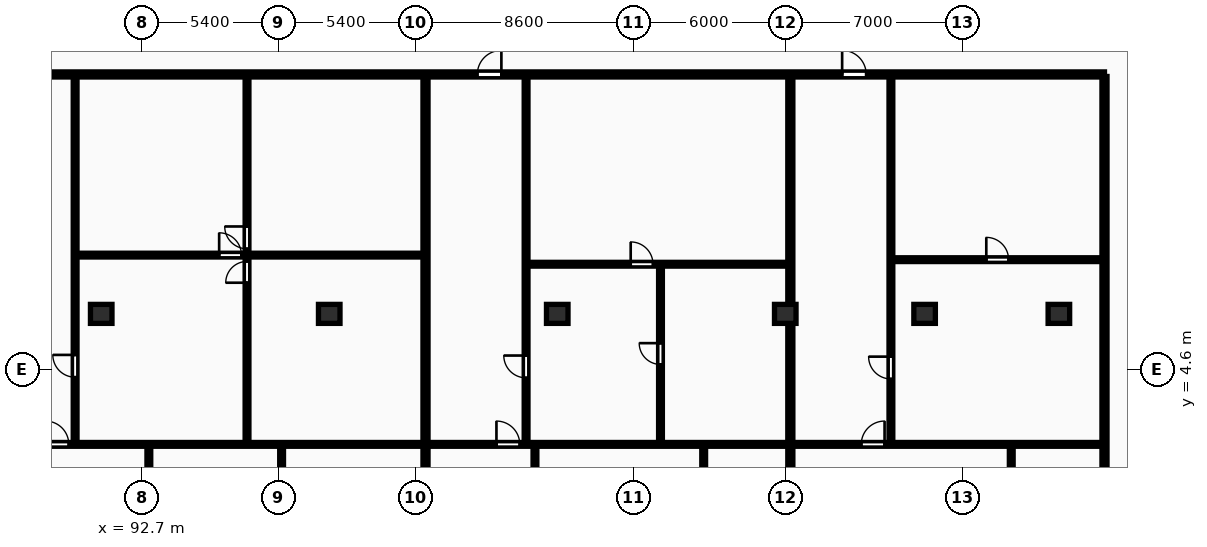
"""IFC4 building model, lengths in metres.
Left out: names, types, materials, properties, quantities, classifications, styles, units other than length and angle.
Written with IfcOpenShell. Run it as: python <this file> out.ifc"""

import sys

from ifc_helpers import new_model, si_unit, direction, frame, frame_2d, origin, origin_2d, place, context, subcontext, project, spatial, rectangle, extrude, element, fill, save


model = new_model("IFC4")
c1 = context("Model", 3, precision=1e-05, world=origin(), true_north=direction((0.0, 1.0)))
c2 = subcontext(c1, "Body", "Model", "MODEL_VIEW")
j1 = project(units=[si_unit("LENGTHUNIT", "METRE"), si_unit("PLANEANGLEUNIT", "RADIAN")], contexts=[c1])
p1 = place(None, origin())
s1 = spatial("IfcSite", under=j1, at=p1, CompositionType="ELEMENT")
p2 = place(p1, origin())
s2 = spatial("IfcBuilding", under=s1, at=p2, CompositionType="ELEMENT")
p3 = place(p2, frame((0.0, 0.0, 87.3)))
s3 = spatial("IfcBuildingStorey", under=s2, at=p3, CompositionType="ELEMENT", Elevation=87.3)
for number, where, z_axis, x_axis in (
    (1, (91.1, 6.8, 0.0), (0.0, 0.0, 1.0), (1.0, 0.0, 0.0)),
    (2, (100.1, 6.8, 0.0), (0.0, 0.0, 1.0), (1.0, 0.0, 0.0)),
    (3, (109.1, 6.8, 0.0), (0.0, 0.0, 1.0), (1.0, 0.0, 0.0)),
    (4, (118.1, 6.8, 0.0), (0.0, 0.0, 1.0), (1.0, 0.0, 0.0)),
    (5, (123.6, 6.8, 0.0), (0.0, 0.0, 1.0), (1.0, 0.0, 0.0)),
    (6, (128.9, 6.8, 0.0), (0.0, 0.0, 1.0), (1.0, 0.0, 0.0)),
):
    element("IfcColumn", number, at=place(p3, frame(where, z_axis=z_axis, x_axis=x_axis)), inside=s3, PredefinedType="COLUMN", context=c2, shape_type="SweptSolid", body=[
        extrude(rectangle(XDim=0.85, YDim=0.75, at=origin_2d()), origin(), (0.0, 0.0, 1.0), 3.25),
    ])
for number, where, z_axis, x_axis in (
    (7, (130.7, -8.7, 0.0), (0.0, 0.0, 1.0), (0.0, 1.0, 0.0)),
    (8, (103.9, -8.7, 0.0), (0.0, 0.0, 1.0), (0.0, 1.0, 0.0)),
):
    element("IfcWall", number, at=place(p3, frame(where, z_axis=z_axis, x_axis=x_axis)), inside=s3, PredefinedType="PARTITIONING", context=c2, shape_type="SweptSolid", body=[
        extrude(rectangle(XDim=24.87, YDim=0.2, at=frame_2d((12.435, 0.0))), origin(), (0.0, 0.0, 1.0), 2.97),
    ])
p4 = place(p3, frame((96.855, 1.69, 0.0), z_axis=(0.0, 0.0, 1.0), x_axis=(0.0, 1.0, 0.0)))
e9 = element("IfcWall", 9, at=p4, inside=s3, PredefinedType="PARTITIONING", context=c2, shape_type="SweptSolid", body=[
    extrude(rectangle(XDim=14.5, YDim=0.15, at=frame_2d((7.25, 0.0))), origin(), (0.0, 0.0, 1.0), 2.97),
])
p5 = place(p4, frame((6.34, 0.0, 0.0)))
e10 = element("IfcOpeningElement", 10, at=p5, cuts=e9, PredefinedType="OPENING", context=c2, shape_type="SweptSolid", body=[
    extrude(rectangle(XDim=0.84, YDim=2.04, at=frame_2d((0.42, 1.02))), frame((0.0, 0.085, 0.0), z_axis=(0.0, -1.0, 0.0), x_axis=(1.0, 0.0, 0.0)), (0.0, 0.0, 1.0), 0.17),
])
p6 = place(p4, frame((7.68, 0.0, 0.0)))
e11 = element("IfcOpeningElement", 11, at=p6, cuts=e9, PredefinedType="OPENING", context=c2, shape_type="SweptSolid", body=[
    extrude(rectangle(XDim=0.88, YDim=2.06, at=frame_2d((0.44, 1.03))), frame((0.0, 0.085, 0.0), z_axis=(0.0, -1.0, 0.0), x_axis=(1.0, 0.0, 0.0)), (0.0, 0.0, 1.0), 0.17),
])
p7 = place(p3, frame((90.13, 9.12, 0.0), z_axis=(0.0, 0.0, 1.0), x_axis=(1.0, 0.0, 0.0)))
e12 = element("IfcWall", 12, at=p7, inside=s3, PredefinedType="PARTITIONING", context=c2, shape_type="SweptSolid", body=[
    extrude(rectangle(XDim=13.69, YDim=0.15, at=frame_2d((6.845, 0.0))), origin(), (0.0, 0.0, 1.0), 2.97),
])
p8 = place(p7, frame((5.625, 0.0, 0.0)))
e13 = element("IfcOpeningElement", 13, at=p8, cuts=e12, PredefinedType="OPENING", context=c2, shape_type="SweptSolid", body=[
    extrude(rectangle(XDim=0.88, YDim=2.06, at=frame_2d((0.44, 1.03))), frame((0.0, 0.085, 0.0), z_axis=(0.0, -1.0, 0.0), x_axis=(1.0, 0.0, 0.0)), (0.0, 0.0, 1.0), 0.17),
])
p9 = place(p3, frame((90.07, 1.69, 0.0), z_axis=(0.0, 0.0, 1.0), x_axis=(0.0, 1.0, 0.0)))
e14 = element("IfcWall", 14, at=p9, inside=s3, PredefinedType="PARTITIONING", context=c2, shape_type="SweptSolid", body=[
    extrude(rectangle(XDim=14.5, YDim=0.15, at=frame_2d((7.25, 0.0))), origin(), (0.0, 0.0, 1.0), 2.97),
])
p10 = place(p9, frame((2.611, 0.0, 0.0)))
e15 = element("IfcOpeningElement", 15, at=p10, cuts=e14, PredefinedType="OPENING", context=c2, shape_type="SweptSolid", body=[
    extrude(rectangle(XDim=0.88, YDim=2.06, at=frame_2d((0.44, 1.03))), frame((0.0, 0.085, 0.0), z_axis=(0.0, -1.0, 0.0), x_axis=(1.0, 0.0, 0.0)), (0.0, 0.0, 1.0), 0.17),
])
p11 = place(p3, frame((92.98, -8.7, 0.0), z_axis=(0.0, 0.0, 1.0), x_axis=(0.0, 1.0, 0.0)))
e16 = element("IfcWall", 16, at=p11, inside=s3, PredefinedType="PARTITIONING", context=c2, shape_type="SweptSolid", body=[
    extrude(rectangle(XDim=10.31, YDim=0.15, at=frame_2d((5.155, 0.0))), origin(), (0.0, 0.0, 1.0), 2.97),
])
p12 = place(p11, frame((6.116, 0.0, 0.0)))
e17 = element("IfcOpeningElement", 17, at=p12, cuts=e16, PredefinedType="OPENING", context=c2, shape_type="SweptSolid", body=[
    extrude(rectangle(XDim=0.92, YDim=2.08, at=frame_2d((0.46, 1.04))), frame((0.0, 0.085, 0.0), z_axis=(0.0, -1.0, 0.0), x_axis=(1.0, 0.0, 0.0)), (0.0, 0.0, 1.0), 0.17),
])
p13 = place(p3, frame((98.22, -0.86, 0.0), z_axis=(0.0, 0.0, 1.0), x_axis=(0.0, 1.0, 0.0)))
e18 = element("IfcWall", 18, at=p13, inside=s3, PredefinedType="PARTITIONING", context=c2, shape_type="SweptSolid", body=[
    extrude(rectangle(XDim=2.47, YDim=0.15, at=frame_2d((1.235, 0.0))), origin(), (0.0, 0.0, 1.0), 2.97),
])
p14 = place(p3, frame((86.18, 1.65, 0.0), z_axis=(0.0, 0.0, 1.0), x_axis=(1.0, 0.0, 0.0)))
e19 = element("IfcWall", 19, at=p14, inside=s3, PredefinedType="PARTITIONING", context=c2, shape_type="SweptSolid", body=[
    extrude(rectangle(XDim=17.64, YDim=0.15, at=frame_2d((8.82, 0.0))), origin(), (0.0, 0.0, 1.0), 2.97),
])
p15 = place(p14, frame((2.72, 0.0, 0.0)))
e20 = element("IfcOpeningElement", 20, at=p15, cuts=e19, PredefinedType="OPENING", context=c2, shape_type="SweptSolid", body=[
    extrude(rectangle(XDim=0.92, YDim=2.08, at=frame_2d((0.46, 1.04))), frame((0.0, 0.085, 0.0), z_axis=(0.0, -1.0, 0.0), x_axis=(1.0, 0.0, 0.0)), (0.0, 0.0, 1.0), 0.17),
])
p16 = place(p3, frame((118.3, -8.7, 0.0), z_axis=(0.0, 0.0, 1.0), x_axis=(0.0, 1.0, 0.0)))
e21 = element("IfcWall", 21, at=p16, inside=s3, PredefinedType="PARTITIONING", context=c2, shape_type="SweptSolid", body=[
    extrude(rectangle(XDim=24.87, YDim=0.2, at=frame_2d((12.435, 0.0))), origin(), (0.0, 0.0, 1.0), 2.2),
])
p17 = place(p3, frame((113.175, 1.69, 0.0), z_axis=(0.0, 0.0, 1.0), x_axis=(0.0, 1.0, 0.0)))
e22 = element("IfcWall", 22, at=p17, inside=s3, PredefinedType="PARTITIONING", context=c2, shape_type="SweptSolid", body=[
    extrude(rectangle(XDim=7.07, YDim=0.15, at=frame_2d((3.535, 0.0))), origin(), (0.0, 0.0, 1.0), 2.97),
])
p18 = place(p17, frame((3.115, 0.0, 0.0)))
e23 = element("IfcOpeningElement", 23, at=p18, cuts=e22, PredefinedType="OPENING", context=c2, shape_type="SweptSolid", body=[
    extrude(rectangle(XDim=0.84, YDim=2.04, at=frame_2d((0.42, 1.02))), frame((0.0, 0.085, 0.0), z_axis=(0.0, -1.0, 0.0), x_axis=(1.0, 0.0, 0.0)), (0.0, 0.0, 1.0), 0.17),
])
p19 = place(p3, frame((107.93, 8.76, 0.0), z_axis=(0.0, 0.0, 1.0), x_axis=(1.0, 0.0, 0.0)))
e24 = element("IfcWall", 24, at=p19, inside=s3, PredefinedType="PARTITIONING", context=c2, shape_type="SweptSolid", body=[
    extrude(rectangle(XDim=10.29, YDim=0.15, at=frame_2d((5.145, 0.0))), origin(), (0.0, 0.0, 1.0), 2.97),
])
p20 = place(p19, frame((4.069, 0.0, 0.0)))
e25 = element("IfcOpeningElement", 25, at=p20, cuts=e24, PredefinedType="OPENING", context=c2, shape_type="SweptSolid", body=[
    extrude(rectangle(XDim=0.88, YDim=2.06, at=frame_2d((0.44, 1.03))), frame((0.0, 0.085, 0.0), z_axis=(0.0, -1.0, 0.0), x_axis=(1.0, 0.0, 0.0)), (0.0, 0.0, 1.0), 0.17),
])
p21 = place(p3, frame((107.87, 1.69, 0.0), z_axis=(0.0, 0.0, 1.0), x_axis=(0.0, 1.0, 0.0)))
e26 = element("IfcWall", 26, at=p21, inside=s3, PredefinedType="PARTITIONING", context=c2, shape_type="SweptSolid", body=[
    extrude(rectangle(XDim=14.5, YDim=0.15, at=frame_2d((7.25, 0.0))), origin(), (0.0, 0.0, 1.0), 2.97),
])
p22 = place(p21, frame((2.586, 0.0, 0.0)))
e27 = element("IfcOpeningElement", 27, at=p22, cuts=e26, PredefinedType="OPENING", context=c2, shape_type="SweptSolid", body=[
    extrude(rectangle(XDim=0.88, YDim=2.06, at=frame_2d((0.44, 1.03))), frame((0.0, 0.085, 0.0), z_axis=(0.0, -1.0, 0.0), x_axis=(1.0, 0.0, 0.0)), (0.0, 0.0, 1.0), 0.17),
])
p23 = place(p3, frame((108.22, -3.39, 0.0), z_axis=(0.0, 0.0, 1.0), x_axis=(0.0, 1.0, 0.0)))
e28 = element("IfcWall", 28, at=p23, inside=s3, PredefinedType="PARTITIONING", context=c2, shape_type="SweptSolid", body=[
    extrude(rectangle(XDim=5.0, YDim=0.15, at=frame_2d((2.5, 0.0))), origin(), (0.0, 0.0, 1.0), 2.97),
])
p24 = place(p23, frame((2.06, 0.0, 0.0)))
e29 = element("IfcOpeningElement", 29, at=p24, cuts=e28, PredefinedType="OPENING", context=c2, shape_type="SweptSolid", body=[
    extrude(rectangle(XDim=0.88, YDim=2.06, at=frame_2d((0.44, 1.03))), frame((0.0, 0.085, 0.0), z_axis=(0.0, -1.0, 0.0), x_axis=(1.0, 0.0, 0.0)), (0.0, 0.0, 1.0), 0.17),
])
p25 = place(p3, frame((114.88, -8.7, 0.0), z_axis=(0.0, 0.0, 1.0), x_axis=(0.0, 1.0, 0.0)))
e30 = element("IfcWall", 30, at=p25, inside=s3, PredefinedType="PARTITIONING", context=c2, shape_type="SweptSolid", body=[
    extrude(rectangle(XDim=10.31, YDim=0.15, at=frame_2d((5.155, 0.0))), origin(), (0.0, 0.0, 1.0), 2.97),
])
p26 = place(p25, frame((5.55, 0.0, 0.0)))
e31 = element("IfcOpeningElement", 31, at=p26, cuts=e30, PredefinedType="OPENING", context=c2, shape_type="SweptSolid", body=[
    extrude(rectangle(XDim=0.84, YDim=2.04, at=frame_2d((0.42, 1.02))), frame((0.0, 0.085, 0.0), z_axis=(0.0, -1.0, 0.0), x_axis=(1.0, 0.0, 0.0)), (0.0, 0.0, 1.0), 0.17),
])
p27 = place(p25, frame((8.04, 0.0, 0.0)))
e32 = element("IfcOpeningElement", 32, at=p27, cuts=e30, PredefinedType="OPENING", context=c2, shape_type="SweptSolid", body=[
    extrude(rectangle(XDim=0.84, YDim=2.04, at=frame_2d((0.42, 1.02))), frame((0.0, 0.085, 0.0), z_axis=(0.0, -1.0, 0.0), x_axis=(1.0, 0.0, 0.0)), (0.0, 0.0, 1.0), 0.17),
])
p28 = place(p25, frame((3.95, 0.0, 0.0)))
e33 = element("IfcOpeningElement", 33, at=p28, cuts=e30, PredefinedType="OPENING", context=c2, shape_type="SweptSolid", body=[
    extrude(rectangle(XDim=0.88, YDim=2.06, at=frame_2d((0.44, 1.03))), frame((0.0, 0.085, 0.0), z_axis=(0.0, -1.0, 0.0), x_axis=(1.0, 0.0, 0.0)), (0.0, 0.0, 1.0), 0.17),
])
p29 = place(p3, frame((103.98, 1.65, 0.0), z_axis=(0.0, 0.0, 1.0), x_axis=(1.0, 0.0, 0.0)))
e34 = element("IfcWall", 34, at=p29, inside=s3, PredefinedType="PARTITIONING", context=c2, shape_type="SweptSolid", body=[
    extrude(rectangle(XDim=14.24, YDim=0.15, at=frame_2d((7.12, 0.0))), origin(), (0.0, 0.0, 1.0), 2.97),
])
p30 = place(p29, frame((2.72, 0.0, 0.0)))
e35 = element("IfcOpeningElement", 35, at=p30, cuts=e34, PredefinedType="OPENING", context=c2, shape_type="SweptSolid", body=[
    extrude(rectangle(XDim=0.92, YDim=2.08, at=frame_2d((0.46, 1.04))), frame((0.0, 0.085, 0.0), z_axis=(0.0, -1.0, 0.0), x_axis=(1.0, 0.0, 0.0)), (0.0, 0.0, 1.0), 0.17),
])
p31 = place(p3, frame((122.33, 8.94, 0.0), z_axis=(0.0, 0.0, 1.0), x_axis=(1.0, 0.0, 0.0)))
e36 = element("IfcWall", 36, at=p31, inside=s3, PredefinedType="PARTITIONING", context=c2, shape_type="SweptSolid", body=[
    extrude(rectangle(XDim=8.29, YDim=0.15, at=frame_2d((4.145, 0.0))), origin(), (0.0, 0.0, 1.0), 2.97),
])
p32 = place(p31, frame((3.705, 0.0, 0.0)))
e37 = element("IfcOpeningElement", 37, at=p32, cuts=e36, PredefinedType="OPENING", context=c2, shape_type="SweptSolid", body=[
    extrude(rectangle(XDim=0.88, YDim=2.06, at=frame_2d((0.44, 1.03))), frame((0.0, 0.085, 0.0), z_axis=(0.0, -1.0, 0.0), x_axis=(1.0, 0.0, 0.0)), (0.0, 0.0, 1.0), 0.17),
])
p33 = place(p3, frame((122.27, 1.69, 0.0), z_axis=(0.0, 0.0, 1.0), x_axis=(0.0, 1.0, 0.0)))
e38 = element("IfcWall", 38, at=p33, inside=s3, PredefinedType="PARTITIONING", context=c2, shape_type="SweptSolid", body=[
    extrude(rectangle(XDim=14.5, YDim=0.15, at=frame_2d((7.25, 0.0))), origin(), (0.0, 0.0, 1.0), 2.97),
])
p34 = place(p33, frame((2.542, 0.0, 0.0)))
e39 = element("IfcOpeningElement", 39, at=p34, cuts=e38, PredefinedType="OPENING", context=c2, shape_type="SweptSolid", body=[
    extrude(rectangle(XDim=0.88, YDim=2.06, at=frame_2d((0.44, 1.03))), frame((0.0, 0.085, 0.0), z_axis=(0.0, -1.0, 0.0), x_axis=(1.0, 0.0, 0.0)), (0.0, 0.0, 1.0), 0.17),
])
p35 = place(p3, frame((127.02, -8.7, 0.0), z_axis=(0.0, 0.0, 1.0), x_axis=(0.0, 1.0, 0.0)))
e40 = element("IfcWall", 40, at=p35, inside=s3, PredefinedType="PARTITIONING", context=c2, shape_type="SweptSolid", body=[
    extrude(rectangle(XDim=10.31, YDim=0.15, at=frame_2d((5.155, 0.0))), origin(), (0.0, 0.0, 1.0), 2.97),
])
p36 = place(p35, frame((6.12, 0.0, 0.0)))
e41 = element("IfcOpeningElement", 41, at=p36, cuts=e40, PredefinedType="OPENING", context=c2, shape_type="SweptSolid", body=[
    extrude(rectangle(XDim=0.84, YDim=2.04, at=frame_2d((0.42, 1.02))), frame((0.0, 0.085, 0.0), z_axis=(0.0, -1.0, 0.0), x_axis=(1.0, 0.0, 0.0)), (0.0, 0.0, 1.0), 0.17),
])
p37 = place(p35, frame((8.04, 0.0, 0.0)))
e42 = element("IfcOpeningElement", 42, at=p37, cuts=e40, PredefinedType="OPENING", context=c2, shape_type="SweptSolid", body=[
    extrude(rectangle(XDim=0.84, YDim=2.04, at=frame_2d((0.42, 1.02))), frame((0.0, 0.085, 0.0), z_axis=(0.0, -1.0, 0.0), x_axis=(1.0, 0.0, 0.0)), (0.0, 0.0, 1.0), 0.17),
])
p38 = place(p35, frame((2.001, 0.0, 0.0)))
e43 = element("IfcOpeningElement", 43, at=p38, cuts=e40, PredefinedType="OPENING", context=c2, shape_type="SweptSolid", body=[
    extrude(rectangle(XDim=0.88, YDim=2.06, at=frame_2d((0.44, 1.03))), frame((0.0, 0.085, 0.0), z_axis=(0.0, -1.0, 0.0), x_axis=(1.0, 0.0, 0.0)), (0.0, 0.0, 1.0), 0.17),
])
p39 = place(p3, frame((118.38, 1.65, 0.0), z_axis=(0.0, 0.0, 1.0), x_axis=(1.0, 0.0, 0.0)))
e44 = element("IfcWall", 44, at=p39, inside=s3, PredefinedType="PARTITIONING", context=c2, shape_type="SweptSolid", body=[
    extrude(rectangle(XDim=12.24, YDim=0.15, at=frame_2d((6.12, 0.0))), origin(), (0.0, 0.0, 1.0), 2.97),
])
p40 = place(p39, frame((2.72, 0.0, 0.0)))
e45 = element("IfcOpeningElement", 45, at=p40, cuts=e44, PredefinedType="OPENING", context=c2, shape_type="SweptSolid", body=[
    extrude(rectangle(XDim=0.92, YDim=2.08, at=frame_2d((0.46, 1.04))), frame((0.0, 0.085, 0.0), z_axis=(0.0, -1.0, 0.0), x_axis=(1.0, 0.0, 0.0)), (0.0, 0.0, 1.0), 0.17),
])
p41 = place(p3, frame((72.7, 16.25, 0.0), z_axis=(0.0, 0.0, 1.0), x_axis=(1.0, 0.0, 0.0)))
e46 = element("IfcWall", 46, at=p41, inside=s3, PredefinedType="PARTITIONING", context=c2, shape_type="SweptSolid", body=[
    extrude(rectangle(XDim=58.0, YDim=0.2, at=frame_2d((29.0, 0.0))), origin(), (0.0, 0.0, 1.0), 2.97),
])
p42 = place(p41, frame((2.77, 0.0, 0.0)))
e47 = element("IfcOpeningElement", 47, at=p42, cuts=e46, PredefinedType="OPENING", context=c2, shape_type="SweptSolid", body=[
    extrude(rectangle(XDim=0.95, YDim=2.15, at=frame_2d((0.475, 1.075))), frame((0.0, 0.11, 0.0), z_axis=(0.0, -1.0, 0.0), x_axis=(1.0, 0.0, 0.0)), (0.0, 0.0, 1.0), 0.22),
])
p43 = place(p41, frame((15.445, 0.0, 0.0)))
e48 = element("IfcOpeningElement", 48, at=p43, cuts=e46, PredefinedType="OPENING", context=c2, shape_type="SweptSolid", body=[
    extrude(rectangle(XDim=0.95, YDim=2.15, at=frame_2d((0.475, 1.075))), frame((0.0, 0.11, 0.0), z_axis=(0.0, -1.0, 0.0), x_axis=(1.0, 0.0, 0.0)), (0.0, 0.0, 1.0), 0.22),
])
p44 = place(p41, frame((33.245, 0.0, 0.0)))
e49 = element("IfcOpeningElement", 49, at=p44, cuts=e46, PredefinedType="OPENING", context=c2, shape_type="SweptSolid", body=[
    extrude(rectangle(XDim=0.95, YDim=2.15, at=frame_2d((0.475, 1.075))), frame((0.0, 0.11, 0.0), z_axis=(0.0, -1.0, 0.0), x_axis=(1.0, 0.0, 0.0)), (0.0, 0.0, 1.0), 0.22),
])
p45 = place(p41, frame((47.645, 0.0, 0.0)))
e50 = element("IfcOpeningElement", 50, at=p45, cuts=e46, PredefinedType="OPENING", context=c2, shape_type="SweptSolid", body=[
    extrude(rectangle(XDim=0.95, YDim=2.15, at=frame_2d((0.475, 1.075))), frame((0.0, 0.11, 0.0), z_axis=(0.0, -1.0, 0.0), x_axis=(1.0, 0.0, 0.0)), (0.0, 0.0, 1.0), 0.22),
])
p46 = place(p5, origin())
e51 = element("IfcDoor", 51, at=p46, inside=s3, OperationType="SINGLE_SWING_LEFT", PredefinedType="DOOR", context=c2, shape_type="SweptSolid", body=[
    extrude(rectangle(XDim=0.84, YDim=2.04, at=frame_2d((0.42, 1.02))), frame((0.0, 0.025, 0.0), z_axis=(0.0, -1.0, 0.0), x_axis=(1.0, 0.0, 0.0)), (0.0, 0.0, 1.0), 0.05),
])
fill(e10, e51)
p47 = place(p6, origin())
e52 = element("IfcDoor", 52, at=p47, inside=s3, OperationType="SINGLE_SWING_RIGHT", PredefinedType="DOOR", context=c2, shape_type="SweptSolid", body=[
    extrude(rectangle(XDim=0.88, YDim=2.06, at=frame_2d((0.44, 1.03))), frame((0.0, 0.025, 0.0), z_axis=(0.0, -1.0, 0.0), x_axis=(1.0, 0.0, 0.0)), (0.0, 0.0, 1.0), 0.05),
])
fill(e11, e52)
p48 = place(p8, origin())
e53 = element("IfcDoor", 53, at=p48, inside=s3, OperationType="SINGLE_SWING_LEFT", PredefinedType="DOOR", context=c2, shape_type="SweptSolid", body=[
    extrude(rectangle(XDim=0.88, YDim=2.06, at=frame_2d((0.44, 1.03))), frame((0.0, 0.025, 0.0), z_axis=(0.0, -1.0, 0.0), x_axis=(1.0, 0.0, 0.0)), (0.0, 0.0, 1.0), 0.05),
])
fill(e13, e53)
p49 = place(p10, origin())
e54 = element("IfcDoor", 54, at=p49, inside=s3, OperationType="SINGLE_SWING_RIGHT", PredefinedType="DOOR", context=c2, shape_type="SweptSolid", body=[
    extrude(rectangle(XDim=0.88, YDim=2.06, at=frame_2d((0.44, 1.03))), frame((0.0, 0.025, 0.0), z_axis=(0.0, -1.0, 0.0), x_axis=(1.0, 0.0, 0.0)), (0.0, 0.0, 1.0), 0.05),
])
fill(e15, e54)
p50 = place(p15, origin())
e55 = element("IfcDoor", 55, at=p50, inside=s3, OperationType="SINGLE_SWING_LEFT", PredefinedType="DOOR", context=c2, shape_type="SweptSolid", body=[
    extrude(rectangle(XDim=0.92, YDim=2.08, at=frame_2d((0.46, 1.04))), frame((0.0, 0.025, 0.0), z_axis=(0.0, -1.0, 0.0), x_axis=(1.0, 0.0, 0.0)), (0.0, 0.0, 1.0), 0.05),
])
fill(e20, e55)
p51 = place(p18, origin())
e56 = element("IfcDoor", 56, at=p51, inside=s3, OperationType="SINGLE_SWING_RIGHT", PredefinedType="DOOR", context=c2, shape_type="SweptSolid", body=[
    extrude(rectangle(XDim=0.84, YDim=2.04, at=frame_2d((0.42, 1.02))), frame((0.0, 0.025, 0.0), z_axis=(0.0, -1.0, 0.0), x_axis=(1.0, 0.0, 0.0)), (0.0, 0.0, 1.0), 0.05),
])
fill(e23, e56)
p52 = place(p20, origin())
e57 = element("IfcDoor", 57, at=p52, inside=s3, OperationType="SINGLE_SWING_LEFT", PredefinedType="DOOR", context=c2, shape_type="SweptSolid", body=[
    extrude(rectangle(XDim=0.88, YDim=2.06, at=frame_2d((0.44, 1.03))), frame((0.0, 0.025, 0.0), z_axis=(0.0, -1.0, 0.0), x_axis=(1.0, 0.0, 0.0)), (0.0, 0.0, 1.0), 0.05),
])
fill(e25, e57)
p53 = place(p22, origin())
e58 = element("IfcDoor", 58, at=p53, inside=s3, OperationType="SINGLE_SWING_RIGHT", PredefinedType="DOOR", context=c2, shape_type="SweptSolid", body=[
    extrude(rectangle(XDim=0.88, YDim=2.06, at=frame_2d((0.44, 1.03))), frame((0.0, 0.025, 0.0), z_axis=(0.0, -1.0, 0.0), x_axis=(1.0, 0.0, 0.0)), (0.0, 0.0, 1.0), 0.05),
])
fill(e27, e58)
p54 = place(p30, origin())
e59 = element("IfcDoor", 59, at=p54, inside=s3, OperationType="SINGLE_SWING_LEFT", PredefinedType="DOOR", context=c2, shape_type="SweptSolid", body=[
    extrude(rectangle(XDim=0.92, YDim=2.08, at=frame_2d((0.46, 1.04))), frame((0.0, 0.025, 0.0), z_axis=(0.0, -1.0, 0.0), x_axis=(1.0, 0.0, 0.0)), (0.0, 0.0, 1.0), 0.05),
])
fill(e35, e59)
p55 = place(p32, origin())
e60 = element("IfcDoor", 60, at=p55, inside=s3, OperationType="SINGLE_SWING_LEFT", PredefinedType="DOOR", context=c2, shape_type="SweptSolid", body=[
    extrude(rectangle(XDim=0.88, YDim=2.06, at=frame_2d((0.44, 1.03))), frame((0.0, 0.025, 0.0), z_axis=(0.0, -1.0, 0.0), x_axis=(1.0, 0.0, 0.0)), (0.0, 0.0, 1.0), 0.05),
])
fill(e37, e60)
p56 = place(p34, origin())
e61 = element("IfcDoor", 61, at=p56, inside=s3, OperationType="SINGLE_SWING_RIGHT", PredefinedType="DOOR", context=c2, shape_type="SweptSolid", body=[
    extrude(rectangle(XDim=0.88, YDim=2.06, at=frame_2d((0.44, 1.03))), frame((0.0, 0.025, 0.0), z_axis=(0.0, -1.0, 0.0), x_axis=(1.0, 0.0, 0.0)), (0.0, 0.0, 1.0), 0.05),
])
fill(e39, e61)
p57 = place(p40, origin())
e62 = element("IfcDoor", 62, at=p57, inside=s3, OperationType="SINGLE_SWING_RIGHT", PredefinedType="DOOR", context=c2, shape_type="SweptSolid", body=[
    extrude(rectangle(XDim=0.92, YDim=2.08, at=frame_2d((0.46, 1.04))), frame((0.0, 0.025, 0.0), z_axis=(0.0, -1.0, 0.0), x_axis=(1.0, 0.0, 0.0)), (0.0, 0.0, 1.0), 0.05),
])
fill(e45, e62)
p58 = place(p44, origin())
e63 = element("IfcDoor", 63, at=p58, inside=s3, OperationType="SINGLE_SWING_RIGHT", PredefinedType="DOOR", context=c2, shape_type="SweptSolid", body=[
    extrude(rectangle(XDim=0.95, YDim=2.15, at=frame_2d((0.475, 1.075))), frame((0.0, 0.025, 0.0), z_axis=(0.0, -1.0, 0.0), x_axis=(1.0, 0.0, 0.0)), (0.0, 0.0, 1.0), 0.05),
])
fill(e49, e63)
p59 = place(p45, origin())
e64 = element("IfcDoor", 64, at=p59, inside=s3, OperationType="SINGLE_SWING_LEFT", PredefinedType="DOOR", context=c2, shape_type="SweptSolid", body=[
    extrude(rectangle(XDim=0.95, YDim=2.15, at=frame_2d((0.475, 1.075))), frame((0.0, 0.025, 0.0), z_axis=(0.0, -1.0, 0.0), x_axis=(1.0, 0.0, 0.0)), (0.0, 0.0, 1.0), 0.05),
])
fill(e50, e64)
save(model, sys.argv[1])
